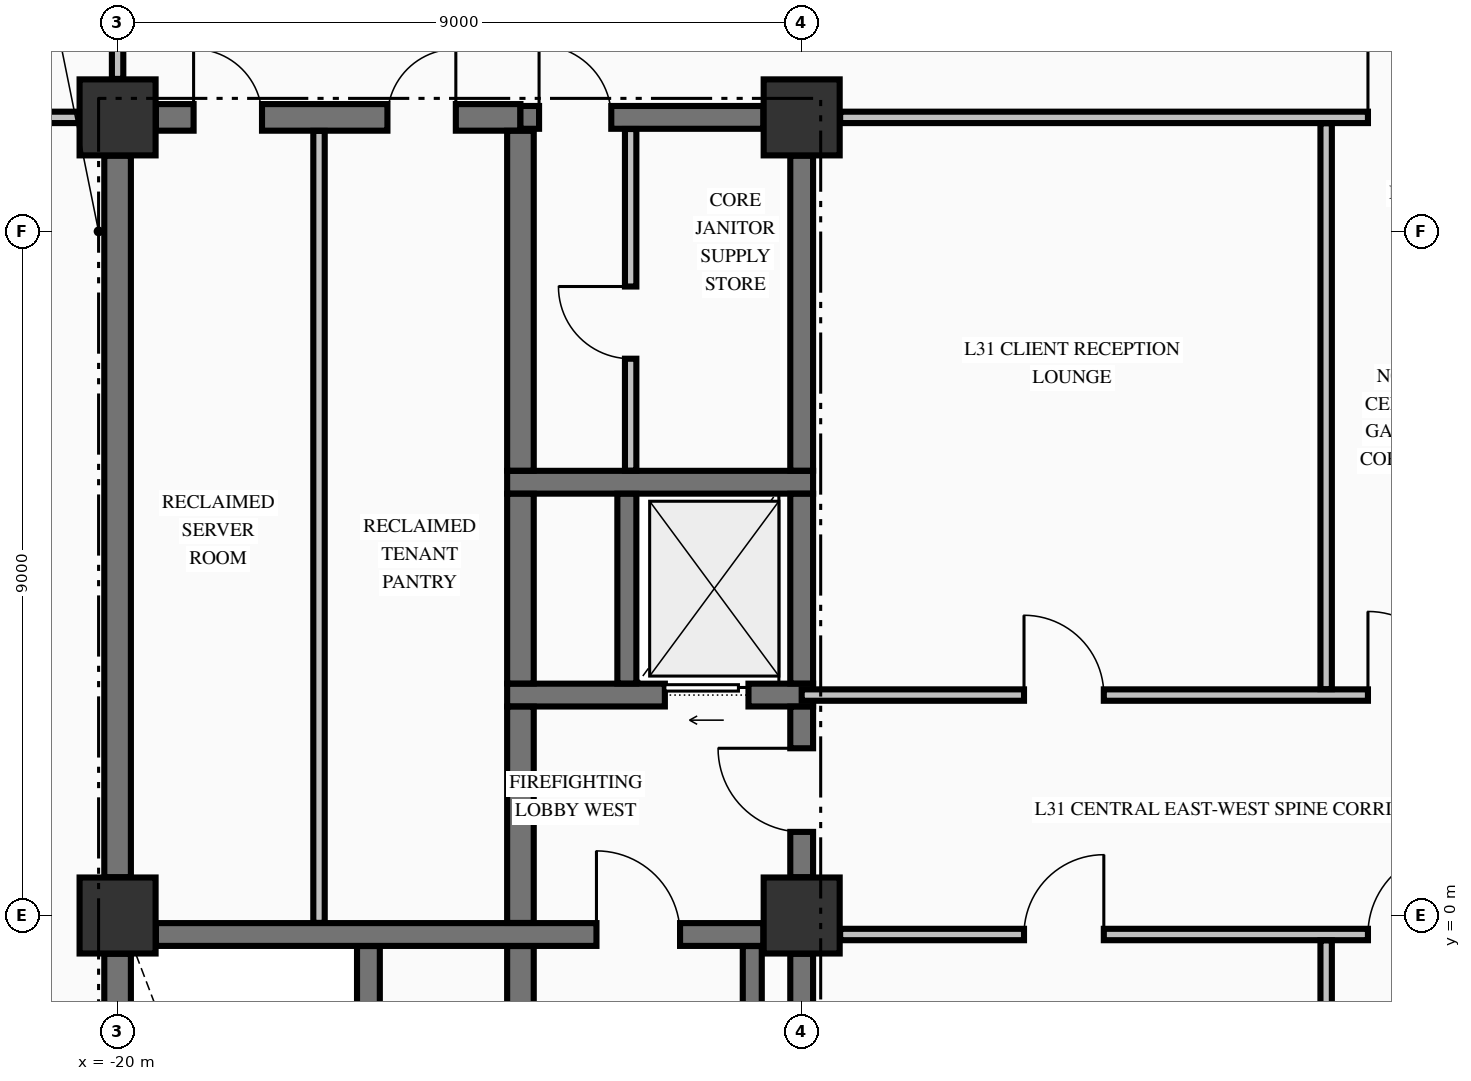
"""IFC4 building model, lengths in metres.
Left out: names, types, materials, properties, quantities, classifications, styles, units other than length and angle.
Written with IfcOpenShell. Run it as: python <this file> out.ifc"""

import sys

from ifc_helpers import new_model, si_unit, direction, frame, frame_2d, origin, origin_2d, place, context, subcontext, project, spatial, rectangle, extrude, element, fill, save


model = new_model("IFC4")
c1 = context("Model", 3, precision=1e-05, world=origin(), true_north=direction((0.0, 1.0)))
c2 = subcontext(c1, "Body", "Model", "MODEL_VIEW")
j1 = project(units=[si_unit("LENGTHUNIT", "METRE"), si_unit("PLANEANGLEUNIT", "RADIAN")], contexts=[c1])
p1 = place(None, origin())
s1 = spatial("IfcSite", under=j1, at=p1, CompositionType="ELEMENT")
p2 = place(p1, origin())
s2 = spatial("IfcBuilding", under=s1, at=p2, CompositionType="ELEMENT")
p3 = place(p2, frame((0.0, 0.0, 124.92)))
s3 = spatial("IfcBuildingStorey", under=s2, at=p3, CompositionType="ELEMENT", Elevation=124.92)
for number, where, z_axis, x_axis in (
    (1, (-20.0, 10.5, -0.25), (0.0, 0.0, 1.0), (1.0, 0.0, 0.0)),
    (2, (-11.0, 0.0, -0.25), (0.0, 0.0, 1.0), (1.0, 0.0, 0.0)),
    (3, (-11.0, 10.5, -0.25), (0.0, 0.0, 1.0), (1.0, 0.0, 0.0)),
    (4, (-20.0, 0.0, -0.25), (0.0, 0.0, 1.0), (1.0, 0.0, 0.0)),
):
    element("IfcColumn", number, at=place(p3, frame(where, z_axis=z_axis, x_axis=x_axis)), inside=s3, PredefinedType="COLUMN", context=c2, shape_type="SweptSolid", body=[
        extrude(rectangle(XDim=1.0, YDim=1.0, at=origin_2d()), origin(), (0.0, 0.0, 1.0), 3.57),
    ])
p4 = place(p3, frame((-19.496, -0.25, 0.0), z_axis=(0.0, 0.0, 1.0), x_axis=(1.0, 0.0, 0.0)))
e5 = element("IfcWall", 5, at=p4, inside=s3, PredefinedType="SHEAR", context=c2, shape_type="SweptSolid", body=[
    extrude(rectangle(XDim=7.992, YDim=0.3, at=frame_2d((3.996, 0.0))), origin(), (0.0, 0.0, 1.0), 3.32),
])
p5 = place(p4, frame((5.796, 0.0, 0.0)))
e6 = element("IfcOpeningElement", 6, at=p5, cuts=e5, PredefinedType="OPENING", context=c2, shape_type="SweptSolid", body=[
    extrude(rectangle(XDim=1.1, YDim=2.15, at=frame_2d((0.55, 1.075))), frame((0.0, 0.16, 0.0), z_axis=(0.0, -1.0, 0.0), x_axis=(1.0, 0.0, 0.0)), (0.0, 0.0, 1.0), 0.32),
])
p6 = place(p3, frame((-14.875, 2.9, 0.0), z_axis=(0.0, 0.0, 1.0), x_axis=(1.0, 0.0, 0.0)))
e7 = element("IfcWall", 7, at=p6, inside=s3, PredefinedType="SHEAR", context=c2, shape_type="SweptSolid", body=[
    extrude(rectangle(XDim=4.025, YDim=0.3, at=frame_2d((2.012, 0.0))), origin(), (0.0, 0.0, 1.0), 3.32),
])
p7 = place(p6, frame((2.075, 0.0, 0.0)))
e8 = element("IfcOpeningElement", 8, at=p7, cuts=e7, PredefinedType="OPENING", context=c2, shape_type="SweptSolid", body=[
    extrude(rectangle(XDim=1.1, YDim=2.2, at=frame_2d((0.55, 1.1))), frame((0.0, 0.16, 0.0), z_axis=(0.0, -1.0, 0.0), x_axis=(1.0, 0.0, 0.0)), (0.0, 0.0, 1.0), 0.32),
])
p8 = place(p3, frame((-14.875, 5.7, 0.0), z_axis=(0.0, 0.0, 1.0), x_axis=(1.0, 0.0, 0.0)))
e9 = element("IfcWall", 9, at=p8, inside=s3, PredefinedType="SHEAR", context=c2, shape_type="SweptSolid", body=[
    extrude(rectangle(XDim=4.025, YDim=0.3, at=frame_2d((2.012, 0.0))), origin(), (0.0, 0.0, 1.0), 3.32),
])
p9 = place(p3, frame((-19.496, 10.5, 0.0), z_axis=(0.0, 0.0, 1.0), x_axis=(1.0, 0.0, 0.0)))
e10 = element("IfcWall", 10, at=p9, inside=s3, PredefinedType="SHEAR", context=c2, shape_type="SweptSolid", body=[
    extrude(rectangle(XDim=4.796, YDim=0.35, at=frame_2d((2.398, 0.0))), origin(), (0.0, 0.0, 1.0), 3.32),
])
p10 = place(p9, frame((0.496, 0.0, 0.0)))
e11 = element("IfcOpeningElement", 11, at=p10, cuts=e10, PredefinedType="OPENING", context=c2, shape_type="SweptSolid", body=[
    extrude(rectangle(XDim=0.9, YDim=2.15, at=frame_2d((0.45, 1.075))), frame((0.0, 0.185, 0.0), z_axis=(0.0, -1.0, 0.0), x_axis=(1.0, 0.0, 0.0)), (0.0, 0.0, 1.0), 0.37),
])
p11 = place(p9, frame((3.046, 0.0, 0.0)))
e12 = element("IfcOpeningElement", 12, at=p11, cuts=e10, PredefinedType="OPENING", context=c2, shape_type="SweptSolid", body=[
    extrude(rectangle(XDim=0.9, YDim=2.15, at=frame_2d((0.45, 1.075))), frame((0.0, 0.185, 0.0), z_axis=(0.0, -1.0, 0.0), x_axis=(1.0, 0.0, 0.0)), (0.0, 0.0, 1.0), 0.37),
])
p12 = place(p3, frame((-14.7, 10.5, 0.0), z_axis=(0.0, 0.0, 1.0), x_axis=(1.0, 0.0, 0.0)))
e13 = element("IfcWall", 13, at=p12, inside=s3, PredefinedType="SHEAR", context=c2, shape_type="SweptSolid", body=[
    extrude(rectangle(XDim=3.196, YDim=0.3, at=frame_2d((1.598, 0.0))), origin(), (0.0, 0.0, 1.0), 3.32),
])
p13 = place(p12, frame((0.245, 0.0, 0.0)))
e14 = element("IfcOpeningElement", 14, at=p13, cuts=e13, PredefinedType="OPENING", context=c2, shape_type="SweptSolid", body=[
    extrude(rectangle(XDim=0.95, YDim=2.15, at=frame_2d((0.475, 1.075))), frame((0.0, 0.16, 0.0), z_axis=(0.0, -1.0, 0.0), x_axis=(1.0, 0.0, 0.0)), (0.0, 0.0, 1.0), 0.32),
])
p14 = place(p3, frame((-10.494, -0.25, 0.0), z_axis=(0.0, 0.0, 1.0), x_axis=(1.0, 0.0, 0.0)))
e15 = element("IfcWall", 15, at=p14, inside=s3, PredefinedType="PARTITIONING", context=c2, shape_type="SweptSolid", body=[
    extrude(rectangle(XDim=20.988, YDim=0.15, at=frame_2d((10.494, 0.0))), origin(), (0.0, 0.0, 1.0), 3.32),
])
p15 = place(p14, frame((6.944, 0.0, 0.0)))
e16 = element("IfcOpeningElement", 16, at=p15, cuts=e15, PredefinedType="OPENING", context=c2, shape_type="SweptSolid", body=[
    extrude(rectangle(XDim=1.1, YDim=2.15, at=frame_2d((0.55, 1.075))), frame((0.0, 0.085, 0.0), z_axis=(0.0, -1.0, 0.0), x_axis=(1.0, 0.0, 0.0)), (0.0, 0.0, 1.0), 0.17),
])
p16 = place(p14, frame((2.419, 0.0, 0.0)))
e17 = element("IfcOpeningElement", 17, at=p16, cuts=e15, PredefinedType="OPENING", context=c2, shape_type="SweptSolid", body=[
    extrude(rectangle(XDim=1.05, YDim=2.15, at=frame_2d((0.525, 1.075))), frame((0.0, 0.085, 0.0), z_axis=(0.0, -1.0, 0.0), x_axis=(1.0, 0.0, 0.0)), (0.0, 0.0, 1.0), 0.17),
])
p17 = place(p14, frame((14.569, 0.0, 0.0)))
e18 = element("IfcOpeningElement", 18, at=p17, cuts=e15, PredefinedType="OPENING", context=c2, shape_type="SweptSolid", body=[
    extrude(rectangle(XDim=0.95, YDim=2.15, at=frame_2d((0.475, 1.075))), frame((0.0, 0.085, 0.0), z_axis=(0.0, -1.0, 0.0), x_axis=(1.0, 0.0, 0.0)), (0.0, 0.0, 1.0), 0.17),
])
p18 = place(p3, frame((-11.0, 2.9, 0.0), z_axis=(0.0, 0.0, 1.0), x_axis=(1.0, 0.0, 0.0)))
e19 = element("IfcWall", 19, at=p18, inside=s3, PredefinedType="PARTITIONING", context=c2, shape_type="SweptSolid", body=[
    extrude(rectangle(XDim=22.0, YDim=0.15, at=frame_2d((11.0, 0.0))), origin(), (0.0, 0.0, 1.0), 3.32),
])
p19 = place(p18, frame((7.45, 0.0, 0.0)))
e20 = element("IfcOpeningElement", 20, at=p19, cuts=e19, PredefinedType="OPENING", context=c2, shape_type="SweptSolid", body=[
    extrude(rectangle(XDim=1.1, YDim=2.15, at=frame_2d((0.55, 1.075))), frame((0.0, 0.085, 0.0), z_axis=(0.0, -1.0, 0.0), x_axis=(1.0, 0.0, 0.0)), (0.0, 0.0, 1.0), 0.17),
])
p20 = place(p18, frame((2.925, 0.0, 0.0)))
e21 = element("IfcOpeningElement", 21, at=p20, cuts=e19, PredefinedType="OPENING", context=c2, shape_type="SweptSolid", body=[
    extrude(rectangle(XDim=1.05, YDim=2.15, at=frame_2d((0.525, 1.075))), frame((0.0, 0.085, 0.0), z_axis=(0.0, -1.0, 0.0), x_axis=(1.0, 0.0, 0.0)), (0.0, 0.0, 1.0), 0.17),
])
p21 = place(p18, frame((11.275, 0.0, 0.0)))
e22 = element("IfcOpeningElement", 22, at=p21, cuts=e19, PredefinedType="OPENING", context=c2, shape_type="SweptSolid", body=[
    extrude(rectangle(XDim=0.95, YDim=2.15, at=frame_2d((0.475, 1.075))), frame((0.0, 0.085, 0.0), z_axis=(0.0, -1.0, 0.0), x_axis=(1.0, 0.0, 0.0)), (0.0, 0.0, 1.0), 0.17),
])
p22 = place(p18, frame((17.725, 0.0, 0.0)))
e23 = element("IfcOpeningElement", 23, at=p22, cuts=e19, PredefinedType="OPENING", context=c2, shape_type="SweptSolid", body=[
    extrude(rectangle(XDim=0.95, YDim=2.15, at=frame_2d((0.475, 1.075))), frame((0.0, 0.085, 0.0), z_axis=(0.0, -1.0, 0.0), x_axis=(1.0, 0.0, 0.0)), (0.0, 0.0, 1.0), 0.17),
])
p23 = place(p3, frame((-27.835, 10.5, 0.0), z_axis=(0.0, 0.0, 1.0), x_axis=(1.0, 0.0, 0.0)))
e24 = element("IfcWall", 24, at=p23, inside=s3, PredefinedType="PARTITIONING", context=c2, shape_type="SweptSolid", body=[
    extrude(rectangle(XDim=7.329, YDim=0.15, at=frame_2d((3.665, 0.0))), origin(), (0.0, 0.0, 1.0), 3.32),
])
p24 = place(p23, frame((3.335, 0.0, 0.0)))
e25 = element("IfcOpeningElement", 25, at=p24, cuts=e24, PredefinedType="OPENING", context=c2, shape_type="SweptSolid", body=[
    extrude(rectangle(XDim=1.0, YDim=2.15, at=frame_2d((0.5, 1.075))), frame((0.0, 0.085, 0.0), z_axis=(0.0, -1.0, 0.0), x_axis=(1.0, 0.0, 0.0)), (0.0, 0.0, 1.0), 0.17),
])
p25 = place(p3, frame((-10.494, 10.5, 0.0), z_axis=(0.0, 0.0, 1.0), x_axis=(1.0, 0.0, 0.0)))
e26 = element("IfcWall", 26, at=p25, inside=s3, PredefinedType="PARTITIONING", context=c2, shape_type="SweptSolid", body=[
    extrude(rectangle(XDim=20.988, YDim=0.15, at=frame_2d((10.494, 0.0))), origin(), (0.0, 0.0, 1.0), 3.32),
])
p26 = place(p25, frame((6.944, 0.0, 0.0)))
e27 = element("IfcOpeningElement", 27, at=p26, cuts=e26, PredefinedType="OPENING", context=c2, shape_type="SweptSolid", body=[
    extrude(rectangle(XDim=1.1, YDim=2.15, at=frame_2d((0.55, 1.075))), frame((0.0, 0.085, 0.0), z_axis=(0.0, -1.0, 0.0), x_axis=(1.0, 0.0, 0.0)), (0.0, 0.0, 1.0), 0.17),
])
p27 = place(p3, frame((-20.0, -9.446, 0.0), z_axis=(0.0, 0.0, 1.0), x_axis=(0.0, 1.0, 0.0)))
e28 = element("IfcWall", 28, at=p27, inside=s3, PredefinedType="SHEAR", context=c2, shape_type="SweptSolid", body=[
    extrude(rectangle(XDim=8.942, YDim=0.35, at=frame_2d((4.471, 0.0))), origin(), (0.0, 0.0, 1.0), 3.32),
])
p28 = place(p3, frame((-20.0, 0.504, 0.0), z_axis=(0.0, 0.0, 1.0), x_axis=(0.0, 1.0, 0.0)))
e29 = element("IfcWall", 29, at=p28, inside=s3, PredefinedType="SHEAR", context=c2, shape_type="SweptSolid", body=[
    extrude(rectangle(XDim=9.492, YDim=0.35, at=frame_2d((4.746, 0.0))), origin(), (0.0, 0.0, 1.0), 3.32),
])
p29 = place(p3, frame((-16.7, -9.773, 0.0), z_axis=(0.0, 0.0, 1.0), x_axis=(0.0, 1.0, 0.0)))
e30 = element("IfcWall", 30, at=p29, inside=s3, PredefinedType="SHEAR", context=c2, shape_type="SweptSolid", body=[
    extrude(rectangle(XDim=9.371, YDim=0.3, at=frame_2d((4.686, 0.0))), origin(), (0.0, 0.0, 1.0), 3.32),
])
p30 = place(p3, frame((-14.7, -9.773, 0.0), z_axis=(0.0, 0.0, 1.0), x_axis=(0.0, 1.0, 0.0)))
e31 = element("IfcWall", 31, at=p30, inside=s3, PredefinedType="SHEAR", context=c2, shape_type="SweptSolid", body=[
    extrude(rectangle(XDim=9.371, YDim=0.35, at=frame_2d((4.686, 0.0))), origin(), (0.0, 0.0, 1.0), 3.32),
])
p31 = place(p3, frame((-14.7, -0.098, 0.0), z_axis=(0.0, 0.0, 1.0), x_axis=(0.0, 1.0, 0.0)))
e32 = element("IfcWall", 32, at=p31, inside=s3, PredefinedType="SHEAR", context=c2, shape_type="SweptSolid", body=[
    extrude(rectangle(XDim=2.846, YDim=0.35, at=frame_2d((1.423, 0.0))), origin(), (0.0, 0.0, 1.0), 3.32),
])
p32 = place(p3, frame((-14.7, 3.052, 0.0), z_axis=(0.0, 0.0, 1.0), x_axis=(0.0, 1.0, 0.0)))
e33 = element("IfcWall", 33, at=p32, inside=s3, PredefinedType="SHEAR", context=c2, shape_type="SweptSolid", body=[
    extrude(rectangle(XDim=2.496, YDim=0.35, at=frame_2d((1.248, 0.0))), origin(), (0.0, 0.0, 1.0), 3.32),
])
p33 = place(p3, frame((-14.7, 5.852, 0.0), z_axis=(0.0, 0.0, 1.0), x_axis=(0.0, 1.0, 0.0)))
e34 = element("IfcWall", 34, at=p33, inside=s3, PredefinedType="SHEAR", context=c2, shape_type="SweptSolid", body=[
    extrude(rectangle(XDim=4.471, YDim=0.35, at=frame_2d((2.235, 0.0))), origin(), (0.0, 0.0, 1.0), 3.32),
])
p34 = place(p3, frame((-13.3, 3.052, 0.0), z_axis=(0.0, 0.0, 1.0), x_axis=(0.0, 1.0, 0.0)))
e35 = element("IfcWall", 35, at=p34, inside=s3, PredefinedType="SOLIDWALL", context=c2, shape_type="SweptSolid", body=[
    extrude(rectangle(XDim=2.496, YDim=0.25, at=frame_2d((1.248, 0.0))), origin(), (0.0, 0.0, 1.0), 3.32),
])
p35 = place(p3, frame((-11.65, -9.798, 0.0), z_axis=(0.0, 0.0, 1.0), x_axis=(0.0, 1.0, 0.0)))
e36 = element("IfcWall", 36, at=p35, inside=s3, PredefinedType="SOLIDWALL", context=c2, shape_type="SweptSolid", body=[
    extrude(rectangle(XDim=9.396, YDim=0.25, at=frame_2d((4.698, 0.0))), origin(), (0.0, 0.0, 1.0), 3.32),
])
p36 = place(p3, frame((-11.0, -9.446, 0.0), z_axis=(0.0, 0.0, 1.0), x_axis=(0.0, 1.0, 0.0)))
e37 = element("IfcWall", 37, at=p36, inside=s3, PredefinedType="SHEAR", context=c2, shape_type="SweptSolid", body=[
    extrude(rectangle(XDim=8.942, YDim=0.3, at=frame_2d((4.471, 0.0))), origin(), (0.0, 0.0, 1.0), 3.32),
])
p37 = place(p3, frame((-11.0, 0.504, 0.0), z_axis=(0.0, 0.0, 1.0), x_axis=(0.0, 1.0, 0.0)))
e38 = element("IfcWall", 38, at=p37, inside=s3, PredefinedType="SHEAR", context=c2, shape_type="SweptSolid", body=[
    extrude(rectangle(XDim=2.244, YDim=0.3, at=frame_2d((1.122, 0.0))), origin(), (0.0, 0.0, 1.0), 3.32),
])
p38 = place(p37, frame((0.596, 0.0, 0.0)))
e39 = element("IfcOpeningElement", 39, at=p38, cuts=e38, PredefinedType="OPENING", context=c2, shape_type="SweptSolid", body=[
    extrude(rectangle(XDim=1.1, YDim=2.15, at=frame_2d((0.55, 1.075))), frame((0.0, 0.16, 0.0), z_axis=(0.0, -1.0, 0.0), x_axis=(1.0, 0.0, 0.0)), (0.0, 0.0, 1.0), 0.32),
])
p39 = place(p3, frame((-11.0, 3.052, 0.0), z_axis=(0.0, 0.0, 1.0), x_axis=(0.0, 1.0, 0.0)))
e40 = element("IfcWall", 40, at=p39, inside=s3, PredefinedType="SHEAR", context=c2, shape_type="SweptSolid", body=[
    extrude(rectangle(XDim=2.496, YDim=0.3, at=frame_2d((1.248, 0.0))), origin(), (0.0, 0.0, 1.0), 3.32),
])
p40 = place(p3, frame((-11.0, 5.852, 0.0), z_axis=(0.0, 0.0, 1.0), x_axis=(0.0, 1.0, 0.0)))
e41 = element("IfcWall", 41, at=p40, inside=s3, PredefinedType="SHEAR", context=c2, shape_type="SweptSolid", body=[
    extrude(rectangle(XDim=4.144, YDim=0.3, at=frame_2d((2.072, 0.0))), origin(), (0.0, 0.0, 1.0), 3.32),
])
p41 = place(p3, frame((-20.0, 11.006, 0.0), z_axis=(0.0, 0.0, 1.0), x_axis=(0.0, 1.0, 0.0)))
e42 = element("IfcWall", 42, at=p41, inside=s3, PredefinedType="PARTITIONING", context=c2, shape_type="SweptSolid", body=[
    extrude(rectangle(XDim=2.716, YDim=0.15, at=frame_2d((1.358, 0.0))), origin(), (0.0, 0.0, 1.0), 2.81),
])
p42 = place(p41, frame((0.669, 0.0, 0.0)))
e43 = element("IfcOpeningElement", 43, at=p42, cuts=e42, PredefinedType="OPENING", context=c2, shape_type="SweptSolid", body=[
    extrude(rectangle(XDim=0.95, YDim=2.15, at=frame_2d((0.475, 1.075))), frame((0.0, 0.085, 0.0), z_axis=(0.0, -1.0, 0.0), x_axis=(1.0, 0.0, 0.0)), (0.0, 0.0, 1.0), 0.17),
])
p43 = place(p3, frame((-17.35, -0.097, 0.0), z_axis=(0.0, 0.0, 1.0), x_axis=(0.0, 1.0, 0.0)))
e44 = element("IfcWall", 44, at=p43, inside=s3, PredefinedType="PARTITIONING", context=c2, shape_type="SweptSolid", body=[
    extrude(rectangle(XDim=10.419, YDim=0.15, at=frame_2d((5.209, 0.0))), origin(), (0.0, 0.0, 1.0), 3.32),
])
p44 = place(p3, frame((-13.25, 5.853, 0.0), z_axis=(0.0, 0.0, 1.0), x_axis=(0.0, 1.0, 0.0)))
e45 = element("IfcWall", 45, at=p44, inside=s3, PredefinedType="PARTITIONING", context=c2, shape_type="SweptSolid", body=[
    extrude(rectangle(XDim=4.494, YDim=0.15, at=frame_2d((2.247, 0.0))), origin(), (0.0, 0.0, 1.0), 3.32),
])
p45 = place(p44, frame((1.472, 0.0, 0.0)))
e46 = element("IfcOpeningElement", 46, at=p45, cuts=e45, PredefinedType="OPENING", context=c2, shape_type="SweptSolid", body=[
    extrude(rectangle(XDim=0.95, YDim=2.15, at=frame_2d((0.475, 1.075))), frame((0.0, 0.085, 0.0), z_axis=(0.0, -1.0, 0.0), x_axis=(1.0, 0.0, 0.0)), (0.0, 0.0, 1.0), 0.17),
])
p46 = place(p3, frame((-4.1, -9.872, 0.0), z_axis=(0.0, 0.0, 1.0), x_axis=(0.0, 1.0, 0.0)))
e47 = element("IfcWall", 47, at=p46, inside=s3, PredefinedType="PARTITIONING", context=c2, shape_type="SweptSolid", body=[
    extrude(rectangle(XDim=9.544, YDim=0.15, at=frame_2d((4.772, 0.0))), origin(), (0.0, 0.0, 1.0), 3.32),
])
p47 = place(p3, frame((-4.1, 2.978, 0.0), z_axis=(0.0, 0.0, 1.0), x_axis=(0.0, 1.0, 0.0)))
e48 = element("IfcWall", 48, at=p47, inside=s3, PredefinedType="PARTITIONING", context=c2, shape_type="SweptSolid", body=[
    extrude(rectangle(XDim=7.444, YDim=0.15, at=frame_2d((3.722, 0.0))), origin(), (0.0, 0.0, 1.0), 3.32),
])
p48 = place(p5, origin())
e49 = element("IfcDoor", 49, at=p48, inside=s3, OperationType="SINGLE_SWING_LEFT", PredefinedType="DOOR", context=c2, shape_type="SweptSolid", body=[
    extrude(rectangle(XDim=1.1, YDim=2.15, at=frame_2d((0.55, 1.075))), frame((0.0, 0.025, 0.0), z_axis=(0.0, -1.0, 0.0), x_axis=(1.0, 0.0, 0.0)), (0.0, 0.0, 1.0), 0.05),
])
fill(e6, e49)
p49 = place(p38, origin())
e50 = element("IfcDoor", 50, at=p49, inside=s3, OperationType="SINGLE_SWING_RIGHT", PredefinedType="DOOR", context=c2, shape_type="SweptSolid", body=[
    extrude(rectangle(XDim=1.1, YDim=2.15, at=frame_2d((0.55, 1.075))), frame((0.0, 0.025, 0.0), z_axis=(0.0, -1.0, 0.0), x_axis=(1.0, 0.0, 0.0)), (0.0, 0.0, 1.0), 0.05),
])
fill(e39, e50)
p50 = place(p7, origin())
e51 = element("IfcDoor", 51, at=p50, inside=s3, OperationType="SLIDING_TO_LEFT", PredefinedType="DOOR", context=c2, shape_type="SweptSolid", body=[
    extrude(rectangle(XDim=1.1, YDim=2.2, at=frame_2d((0.55, 1.1))), frame((0.0, 0.025, 0.0), z_axis=(0.0, -1.0, 0.0), x_axis=(1.0, 0.0, 0.0)), (0.0, 0.0, 1.0), 0.05),
])
fill(e8, e51)
p51 = place(p13, origin())
e52 = element("IfcDoor", 52, at=p51, inside=s3, OperationType="SINGLE_SWING_LEFT", PredefinedType="DOOR", context=c2, shape_type="SweptSolid", body=[
    extrude(rectangle(XDim=0.95, YDim=2.15, at=frame_2d((0.475, 1.075))), frame((0.0, 0.025, 0.0), z_axis=(0.0, -1.0, 0.0), x_axis=(1.0, 0.0, 0.0)), (0.0, 0.0, 1.0), 0.05),
])
fill(e14, e52)
p52 = place(p45, origin())
e53 = element("IfcDoor", 53, at=p52, inside=s3, OperationType="SINGLE_SWING_RIGHT", PredefinedType="DOOR", context=c2, shape_type="SweptSolid", body=[
    extrude(rectangle(XDim=0.95, YDim=2.15, at=frame_2d((0.475, 1.075))), frame((0.0, 0.025, 0.0), z_axis=(0.0, -1.0, 0.0), x_axis=(1.0, 0.0, 0.0)), (0.0, 0.0, 1.0), 0.05),
])
fill(e46, e53)
p53 = place(p10, origin())
e54 = element("IfcDoor", 54, at=p53, inside=s3, OperationType="SINGLE_SWING_LEFT", PredefinedType="DOOR", context=c2, shape_type="SweptSolid", body=[
    extrude(rectangle(XDim=0.9, YDim=2.15, at=frame_2d((0.45, 1.075))), frame((0.0, 0.025, 0.0), z_axis=(0.0, -1.0, 0.0), x_axis=(1.0, 0.0, 0.0)), (0.0, 0.0, 1.0), 0.05),
])
fill(e11, e54)
p54 = place(p11, origin())
e55 = element("IfcDoor", 55, at=p54, inside=s3, OperationType="SINGLE_SWING_RIGHT", PredefinedType="DOOR", context=c2, shape_type="SweptSolid", body=[
    extrude(rectangle(XDim=0.9, YDim=2.15, at=frame_2d((0.45, 1.075))), frame((0.0, 0.025, 0.0), z_axis=(0.0, -1.0, 0.0), x_axis=(1.0, 0.0, 0.0)), (0.0, 0.0, 1.0), 0.05),
])
fill(e12, e55)
p55 = place(p26, origin())
e56 = element("IfcDoor", 56, at=p55, inside=s3, OperationType="SINGLE_SWING_LEFT", PredefinedType="DOOR", context=c2, shape_type="SweptSolid", body=[
    extrude(rectangle(XDim=1.1, YDim=2.15, at=frame_2d((0.55, 1.075))), frame((0.0, 0.025, 0.0), z_axis=(0.0, -1.0, 0.0), x_axis=(1.0, 0.0, 0.0)), (0.0, 0.0, 1.0), 0.05),
])
fill(e27, e56)
p56 = place(p19, origin())
e57 = element("IfcDoor", 57, at=p56, inside=s3, OperationType="SINGLE_SWING_LEFT", PredefinedType="DOOR", context=c2, shape_type="SweptSolid", body=[
    extrude(rectangle(XDim=1.1, YDim=2.15, at=frame_2d((0.55, 1.075))), frame((0.0, 0.025, 0.0), z_axis=(0.0, -1.0, 0.0), x_axis=(1.0, 0.0, 0.0)), (0.0, 0.0, 1.0), 0.05),
])
fill(e20, e57)
p57 = place(p15, origin())
e58 = element("IfcDoor", 58, at=p57, inside=s3, OperationType="SINGLE_SWING_RIGHT", PredefinedType="DOOR", context=c2, shape_type="SweptSolid", body=[
    extrude(rectangle(XDim=1.1, YDim=2.15, at=frame_2d((0.55, 1.075))), frame((0.0, 0.025, 0.0), z_axis=(0.0, -1.0, 0.0), x_axis=(1.0, 0.0, 0.0)), (0.0, 0.0, 1.0), 0.05),
])
fill(e16, e58)
p58 = place(p20, origin())
e59 = element("IfcDoor", 59, at=p58, inside=s3, OperationType="SINGLE_SWING_LEFT", PredefinedType="DOOR", context=c2, shape_type="SweptSolid", body=[
    extrude(rectangle(XDim=1.05, YDim=2.15, at=frame_2d((0.525, 1.075))), frame((0.0, 0.025, 0.0), z_axis=(0.0, -1.0, 0.0), x_axis=(1.0, 0.0, 0.0)), (0.0, 0.0, 1.0), 0.05),
])
fill(e21, e59)
p59 = place(p16, origin())
e60 = element("IfcDoor", 60, at=p59, inside=s3, OperationType="SINGLE_SWING_RIGHT", PredefinedType="DOOR", context=c2, shape_type="SweptSolid", body=[
    extrude(rectangle(XDim=1.05, YDim=2.15, at=frame_2d((0.525, 1.075))), frame((0.0, 0.025, 0.0), z_axis=(0.0, -1.0, 0.0), x_axis=(1.0, 0.0, 0.0)), (0.0, 0.0, 1.0), 0.05),
])
fill(e17, e60)
save(model, sys.argv[1])
